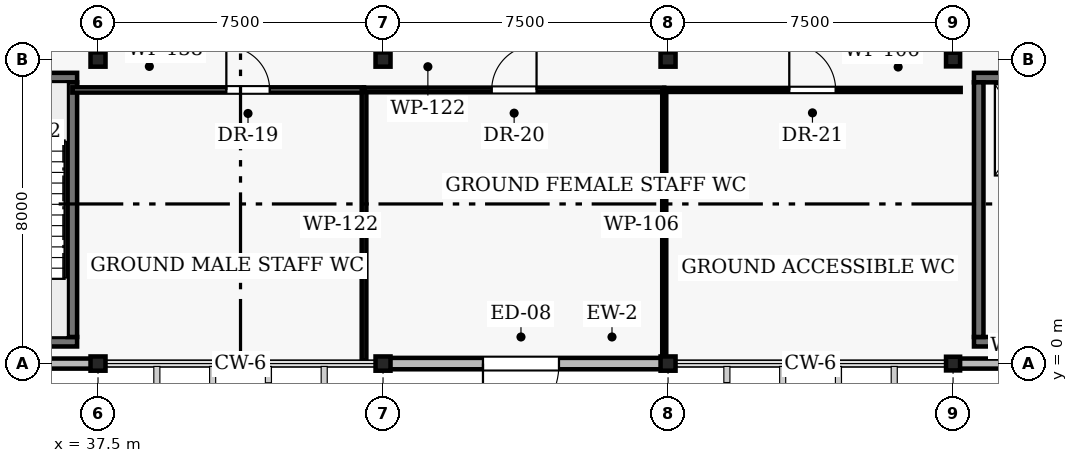
"""IFC4 building model, lengths in metres.
Left out: names, types, materials, properties, quantities, classifications, styles, units other than length and angle.
Written with IfcOpenShell. Run it as: python <this file> out.ifc"""

import sys

from ifc_helpers import new_model, si_unit, direction, frame, frame_2d, origin, origin_2d, place, context, subcontext, project, spatial, rectangle, i_section, extrude, element, fill, save


model = new_model("IFC4")
c1 = context("Model", 3, precision=1e-05, world=origin(), true_north=direction((0.0, 1.0)))
c2 = subcontext(c1, "Body", "Model", "MODEL_VIEW")
j1 = project(units=[si_unit("LENGTHUNIT", "METRE"), si_unit("PLANEANGLEUNIT", "RADIAN")], contexts=[c1])
p1 = place(None, origin())
s1 = spatial("IfcSite", under=j1, at=p1, CompositionType="ELEMENT")
p2 = place(p1, origin())
s2 = spatial("IfcBuilding", under=s1, at=p2, CompositionType="ELEMENT")
p3 = place(p2, origin())
s3 = spatial("IfcBuildingStorey", under=s2, at=p3, CompositionType="ELEMENT", Elevation=0.0)
for number, where, z_axis, x_axis in (
    (1, (37.5, 0.0, 0.0), (0.0, 0.0, 1.0), (1.0, 0.0, 0.0)),
    (2, (37.5, 8.0, 0.0), (0.0, 0.0, 1.0), (1.0, 0.0, 0.0)),
    (3, (45.0, 0.0, 0.0), (0.0, 0.0, 1.0), (1.0, 0.0, 0.0)),
    (4, (45.0, 8.0, 0.0), (0.0, 0.0, 1.0), (1.0, 0.0, 0.0)),
    (5, (52.5, 0.0, 0.0), (0.0, 0.0, 1.0), (1.0, 0.0, 0.0)),
    (6, (52.5, 8.0, 0.0), (0.0, 0.0, 1.0), (1.0, 0.0, 0.0)),
):
    element("IfcColumn", number, at=place(p3, frame(where, z_axis=z_axis, x_axis=x_axis)), inside=s3, PredefinedType="COLUMN", context=c2, shape_type="SweptSolid", body=[
        extrude(i_section(OverallWidth=0.394, OverallDepth=0.375, WebThickness=0.021, FlangeThickness=0.033, FilletRadius=0.018, at=origin_2d()), origin(), (0.0, 0.0, 1.0), 4.5),
    ])
for number, where, z_axis, x_axis in (
    (7, (60.0, 0.0, 0.0), (0.0, 0.0, 1.0), (1.0, 0.0, 0.0)),
    (8, (60.0, 8.0, 0.0), (0.0, 0.0, 1.0), (1.0, 0.0, 0.0)),
):
    element("IfcColumn", number, at=place(p3, frame(where, z_axis=z_axis, x_axis=x_axis)), inside=s3, PredefinedType="COLUMN", context=c2, shape_type="SweptSolid", body=[
        extrude(i_section(OverallWidth=0.37, OverallDepth=0.36, WebThickness=0.012, FlangeThickness=0.02, FilletRadius=0.015, at=origin_2d()), origin(), (0.0, 0.0, 1.0), 4.5),
    ])
p4 = place(p3, frame((30.08, 0.0, 0.0), z_axis=(0.0, 0.0, 1.0), x_axis=(1.0, 0.0, 0.0)))
e9 = element("IfcWall", 9, at=p4, inside=s3, PredefinedType="SOLIDWALL", context=c2, shape_type="SweptSolid", body=[
    extrude(rectangle(XDim=7.34, YDim=0.265, at=frame_2d((3.67, 0.0))), origin(), (0.0, 0.0, 1.0), 3.85),
])
p5 = place(p4, frame((1.2, 0.0, 1.05)))
e10 = element("IfcOpeningElement", 10, at=p5, cuts=e9, PredefinedType="OPENING", context=c2, shape_type="SweptSolid", body=[
    extrude(rectangle(XDim=1.2, YDim=1.5, at=frame_2d((0.6, 0.75))), frame((0.0, 0.142, 0.0), z_axis=(0.0, -1.0, 0.0), x_axis=(1.0, 0.0, 0.0)), (0.0, 0.0, 1.0), 0.285),
])
p6 = place(p4, frame((4.1, 0.0, 1.05)))
e11 = element("IfcOpeningElement", 11, at=p6, cuts=e9, PredefinedType="OPENING", context=c2, shape_type="SweptSolid", body=[
    extrude(rectangle(XDim=1.2, YDim=1.65, at=frame_2d((0.6, 0.825))), frame((0.0, 0.142, 0.0), z_axis=(0.0, -1.0, 0.0), x_axis=(1.0, 0.0, 0.0)), (0.0, 0.0, 1.0), 0.285),
])
p7 = place(p3, frame((45.08, 0.0, 0.0), z_axis=(0.0, 0.0, 1.0), x_axis=(1.0, 0.0, 0.0)))
e12 = element("IfcWall", 12, at=p7, inside=s3, PredefinedType="SOLIDWALL", context=c2, shape_type="SweptSolid", body=[
    extrude(rectangle(XDim=7.34, YDim=0.3, at=frame_2d((3.67, 0.0))), origin(), (0.0, 0.0, 1.0), 3.75),
])
p8 = place(p7, frame((2.55, 0.0, 0.0)))
e13 = element("IfcOpeningElement", 13, at=p8, cuts=e12, PredefinedType="OPENING", context=c2, shape_type="SweptSolid", body=[
    extrude(rectangle(XDim=2.0, YDim=2.2, at=frame_2d((1.0, 1.1))), frame((0.0, 0.16, 0.0), z_axis=(0.0, -1.0, 0.0), x_axis=(1.0, 0.0, 0.0)), (0.0, 0.0, 1.0), 0.32),
])
p9 = place(p3, frame((60.08, 0.0, 0.0), z_axis=(0.0, 0.0, 1.0), x_axis=(1.0, 0.0, 0.0)))
e14 = element("IfcWall", 14, at=p9, inside=s3, PredefinedType="SOLIDWALL", context=c2, shape_type="SweptSolid", body=[
    extrude(rectangle(XDim=7.34, YDim=0.265, at=frame_2d((3.67, 0.0))), origin(), (0.0, 0.0, 1.0), 3.85),
])
p10 = place(p9, frame((1.2, 0.0, 1.05)))
e15 = element("IfcOpeningElement", 15, at=p10, cuts=e14, PredefinedType="OPENING", context=c2, shape_type="SweptSolid", body=[
    extrude(rectangle(XDim=1.2, YDim=1.8, at=frame_2d((0.6, 0.9))), frame((0.0, 0.142, 0.0), z_axis=(0.0, -1.0, 0.0), x_axis=(1.0, 0.0, 0.0)), (0.0, 0.0, 1.0), 0.285),
])
p11 = place(p9, frame((4.1, 0.0, 1.05)))
e16 = element("IfcOpeningElement", 16, at=p11, cuts=e14, PredefinedType="OPENING", context=c2, shape_type="SweptSolid", body=[
    extrude(rectangle(XDim=1.35, YDim=1.35, at=frame_2d((0.675, 0.675))), frame((0.0, 0.142, 0.0), z_axis=(0.0, -1.0, 0.0), x_axis=(1.0, 0.0, 0.0)), (0.0, 0.0, 1.0), 0.285),
])
p12 = place(p3, frame((30.55, 0.575, 0.0), z_axis=(0.0, 0.0, 1.0), x_axis=(1.0, 0.0, 0.0)))
e17 = element("IfcWall", 17, at=p12, inside=s3, PredefinedType="SHEAR", context=c2, shape_type="SweptSolid", body=[
    extrude(rectangle(XDim=6.4, YDim=0.25, at=frame_2d((3.2, 0.0))), origin(), (0.0, 0.0, 1.0), 4.5),
])
p13 = place(p3, frame((30.55, 7.525, 0.0), z_axis=(0.0, 0.0, 1.0), x_axis=(1.0, 0.0, 0.0)))
e18 = element("IfcWall", 18, at=p13, inside=s3, PredefinedType="SHEAR", context=c2, shape_type="SweptSolid", body=[
    extrude(rectangle(XDim=6.4, YDim=0.25, at=frame_2d((3.2, 0.0))), origin(), (0.0, 0.0, 1.0), 4.5),
])
p14 = place(p13, frame((0.8, 0.0, 0.0)))
e19 = element("IfcOpeningElement", 19, at=p14, cuts=e18, PredefinedType="OPENING", context=c2, shape_type="SweptSolid", body=[
    extrude(rectangle(XDim=1.1, YDim=2.15, at=frame_2d((0.55, 1.075))), frame((0.0, 0.135, 0.0), z_axis=(0.0, -1.0, 0.0), x_axis=(1.0, 0.0, 0.0)), (0.0, 0.0, 1.0), 0.27),
])
p15 = place(p13, frame((3.775, 0.0, 0.0)))
e20 = element("IfcOpeningElement", 20, at=p15, cuts=e18, PredefinedType="OPENING", context=c2, shape_type="SweptSolid", body=[
    extrude(rectangle(XDim=1.25, YDim=2.15, at=frame_2d((0.625, 1.075))), frame((0.0, 0.135, 0.0), z_axis=(0.0, -1.0, 0.0), x_axis=(1.0, 0.0, 0.0)), (0.0, 0.0, 1.0), 0.27),
])
p16 = place(p3, frame((36.825, 0.7, 0.0), z_axis=(0.0, 0.0, 1.0), x_axis=(0.0, 1.0, 0.0)))
e21 = element("IfcWall", 21, at=p16, inside=s3, PredefinedType="SHEAR", context=c2, shape_type="SweptSolid", body=[
    extrude(rectangle(XDim=6.7, YDim=0.25, at=frame_2d((3.35, 0.0))), origin(), (0.0, 0.0, 1.0), 4.5),
])
p17 = place(p3, frame((60.55, 0.575, 0.0), z_axis=(0.0, 0.0, 1.0), x_axis=(1.0, 0.0, 0.0)))
e22 = element("IfcWall", 22, at=p17, inside=s3, PredefinedType="SHEAR", context=c2, shape_type="SweptSolid", body=[
    extrude(rectangle(XDim=6.4, YDim=0.25, at=frame_2d((3.2, 0.0))), origin(), (0.0, 0.0, 1.0), 4.5),
])
p18 = place(p3, frame((60.55, 7.525, 0.0), z_axis=(0.0, 0.0, 1.0), x_axis=(1.0, 0.0, 0.0)))
e23 = element("IfcWall", 23, at=p18, inside=s3, PredefinedType="SHEAR", context=c2, shape_type="SweptSolid", body=[
    extrude(rectangle(XDim=6.4, YDim=0.25, at=frame_2d((3.2, 0.0))), origin(), (0.0, 0.0, 1.0), 4.5),
])
p19 = place(p18, frame((0.8, 0.0, 0.0)))
e24 = element("IfcOpeningElement", 24, at=p19, cuts=e23, PredefinedType="OPENING", context=c2, shape_type="SweptSolid", body=[
    extrude(rectangle(XDim=1.1, YDim=2.15, at=frame_2d((0.55, 1.075))), frame((0.0, 0.135, 0.0), z_axis=(0.0, -1.0, 0.0), x_axis=(1.0, 0.0, 0.0)), (0.0, 0.0, 1.0), 0.27),
])
p20 = place(p18, frame((3.775, 0.0, 0.0)))
e25 = element("IfcOpeningElement", 25, at=p20, cuts=e23, PredefinedType="OPENING", context=c2, shape_type="SweptSolid", body=[
    extrude(rectangle(XDim=1.25, YDim=2.15, at=frame_2d((0.625, 1.075))), frame((0.0, 0.135, 0.0), z_axis=(0.0, -1.0, 0.0), x_axis=(1.0, 0.0, 0.0)), (0.0, 0.0, 1.0), 0.27),
])
p21 = place(p3, frame((60.675, 0.7, 0.0), z_axis=(0.0, 0.0, 1.0), x_axis=(0.0, 1.0, 0.0)))
e26 = element("IfcWall", 26, at=p21, inside=s3, PredefinedType="SHEAR", context=c2, shape_type="SweptSolid", body=[
    extrude(rectangle(XDim=6.7, YDim=0.25, at=frame_2d((3.35, 0.0))), origin(), (0.0, 0.0, 1.0), 4.5),
])
p22 = place(p3, frame((36.825, 7.2, 0.0), z_axis=(0.0, 0.0, 1.0), x_axis=(1.0, 0.0, 0.0)))
e27 = element("IfcWall", 27, at=p22, inside=s3, PredefinedType="PARTITIONING", context=c2, shape_type="SweptSolid", body=[
    extrude(rectangle(XDim=7.675, YDim=0.138, at=frame_2d((3.837, 0.0))), origin(), (0.0, 0.0, 1.0), 3.7),
])
p23 = place(p22, frame((4.052, 0.0, 0.0)))
e28 = element("IfcOpeningElement", 28, at=p23, cuts=e27, PredefinedType="OPENING", context=c2, shape_type="SweptSolid", body=[
    extrude(rectangle(XDim=1.14, YDim=2.16, at=frame_2d((0.57, 1.08))), frame((0.0, 0.079, 0.0), z_axis=(0.0, -1.0, 0.0), x_axis=(1.0, 0.0, 0.0)), (0.0, 0.0, 1.0), 0.158),
])
p24 = place(p3, frame((44.5, 0.08, 0.0), z_axis=(0.0, 0.0, 1.0), x_axis=(0.0, 1.0, 0.0)))
e29 = element("IfcWall", 29, at=p24, inside=s3, PredefinedType="PARTITIONING", context=c2, shape_type="SweptSolid", body=[
    extrude(rectangle(XDim=7.12, YDim=0.122, at=frame_2d((3.56, 0.0))), origin(), (0.0, 0.0, 1.0), 3.7),
])
p25 = place(p3, frame((44.5, 7.2, 0.0), z_axis=(0.0, 0.0, 1.0), x_axis=(1.0, 0.0, 0.0)))
e30 = element("IfcWall", 30, at=p25, inside=s3, PredefinedType="PARTITIONING", context=c2, shape_type="SweptSolid", body=[
    extrude(rectangle(XDim=7.9, YDim=0.122, at=frame_2d((3.95, 0.0))), origin(), (0.0, 0.0, 1.0), 3.7),
])
p26 = place(p25, frame((3.36, 0.0, 0.0)))
e31 = element("IfcOpeningElement", 31, at=p26, cuts=e30, PredefinedType="OPENING", context=c2, shape_type="SweptSolid", body=[
    extrude(rectangle(XDim=1.18, YDim=2.14, at=frame_2d((0.59, 1.07))), frame((0.0, 0.071, 0.0), z_axis=(0.0, -1.0, 0.0), x_axis=(1.0, 0.0, 0.0)), (0.0, 0.0, 1.0), 0.142),
])
p27 = place(p3, frame((52.4, 0.08, 0.0), z_axis=(0.0, 0.0, 1.0), x_axis=(0.0, 1.0, 0.0)))
e32 = element("IfcWall", 32, at=p27, inside=s3, PredefinedType="PARTITIONING", context=c2, shape_type="SweptSolid", body=[
    extrude(rectangle(XDim=7.12, YDim=0.106, at=frame_2d((3.56, 0.0))), origin(), (0.0, 0.0, 1.0), 3.7),
])
p28 = place(p3, frame((52.4, 7.2, 0.0), z_axis=(0.0, 0.0, 1.0), x_axis=(1.0, 0.0, 0.0)))
e33 = element("IfcWall", 33, at=p28, inside=s3, PredefinedType="PARTITIONING", context=c2, shape_type="SweptSolid", body=[
    extrude(rectangle(XDim=7.8, YDim=0.106, at=frame_2d((3.9, 0.0))), origin(), (0.0, 0.0, 1.0), 3.7),
])
p29 = place(p28, frame((3.29, 0.0, 0.0)))
e34 = element("IfcOpeningElement", 34, at=p29, cuts=e33, PredefinedType="OPENING", context=c2, shape_type="SweptSolid", body=[
    extrude(rectangle(XDim=1.22, YDim=2.15, at=frame_2d((0.61, 1.075))), frame((0.0, 0.063, 0.0), z_axis=(0.0, -1.0, 0.0), x_axis=(1.0, 0.0, 0.0)), (0.0, 0.0, 1.0), 0.126),
])
p30 = place(p8, frame((2.0, 0.0, 0.0), z_axis=(0.0, 0.0, 1.0), x_axis=(-1.0, 0.0, 0.0)))
e35 = element("IfcDoor", 35, at=p30, inside=s3, OperationType="SINGLE_SWING_RIGHT", PredefinedType="DOOR", context=c2, shape_type="SweptSolid", body=[
    extrude(rectangle(XDim=2.0, YDim=2.2, at=frame_2d((1.0, 1.1))), frame((0.0, 0.025, 0.0), z_axis=(0.0, -1.0, 0.0), x_axis=(1.0, 0.0, 0.0)), (0.0, 0.0, 1.0), 0.05),
])
fill(e13, e35)
p31 = place(p23, origin())
e36 = element("IfcDoor", 36, at=p31, inside=s3, OperationType="SINGLE_SWING_LEFT", PredefinedType="DOOR", context=c2, shape_type="SweptSolid", body=[
    extrude(rectangle(XDim=1.14, YDim=2.16, at=frame_2d((0.57, 1.08))), frame((0.0, 0.025, 0.0), z_axis=(0.0, -1.0, 0.0), x_axis=(1.0, 0.0, 0.0)), (0.0, 0.0, 1.0), 0.05),
])
fill(e28, e36)
p32 = place(p26, origin())
e37 = element("IfcDoor", 37, at=p32, inside=s3, OperationType="SINGLE_SWING_RIGHT", PredefinedType="DOOR", context=c2, shape_type="SweptSolid", body=[
    extrude(rectangle(XDim=1.18, YDim=2.14, at=frame_2d((0.59, 1.07))), frame((0.0, 0.025, 0.0), z_axis=(0.0, -1.0, 0.0), x_axis=(1.0, 0.0, 0.0)), (0.0, 0.0, 1.0), 0.05),
])
fill(e31, e37)
p33 = place(p29, origin())
e38 = element("IfcDoor", 38, at=p33, inside=s3, OperationType="SINGLE_SWING_LEFT", PredefinedType="DOOR", context=c2, shape_type="SweptSolid", body=[
    extrude(rectangle(XDim=1.22, YDim=2.15, at=frame_2d((0.61, 1.075))), frame((0.0, 0.025, 0.0), z_axis=(0.0, -1.0, 0.0), x_axis=(1.0, 0.0, 0.0)), (0.0, 0.0, 1.0), 0.05),
])
fill(e34, e38)
save(model, sys.argv[1])
